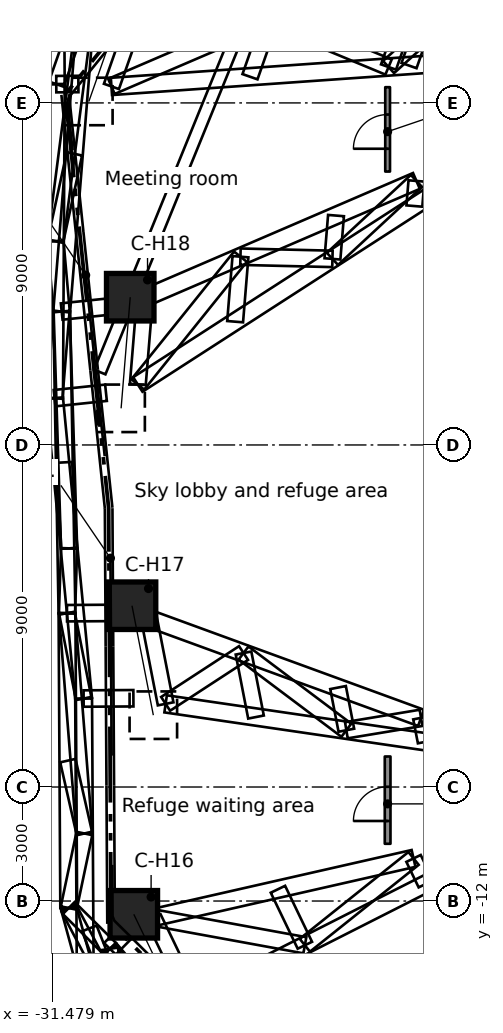
"""IFC4 building model, lengths in metres.
Left out: names, types, materials, properties, quantities, classifications, styles, units other than length and angle.
Written with IfcOpenShell. Run it as: python <this file> out.ifc"""

import sys

from ifc_helpers import new_model, si_unit, direction, frame, frame_2d, origin, origin_2d, place, context, subcontext, project, spatial, rectangle, extrude, element, fill, save


model = new_model("IFC4")
c1 = context("Model", 3, precision=1e-05, world=origin(), true_north=direction((0.0, 1.0)))
c2 = subcontext(c1, "Body", "Model", "MODEL_VIEW")
j1 = project(units=[si_unit("LENGTHUNIT", "METRE"), si_unit("PLANEANGLEUNIT", "RADIAN")], contexts=[c1])
p1 = place(None, origin())
s1 = spatial("IfcSite", under=j1, at=p1, CompositionType="ELEMENT")
p2 = place(p1, origin())
s2 = spatial("IfcBuilding", under=s1, at=p2, CompositionType="ELEMENT")
p3 = place(p2, frame((0.0, 0.0, 206.1)))
s3 = spatial("IfcBuildingStorey", under=s2, at=p3, CompositionType="ELEMENT", Elevation=206.1)
p4 = place(p3, frame((-29.329, -12.349, 0.413), z_axis=(0.286274556016, -0.5954182598, 0.750682339258), x_axis=(0.901243098623, 0.433313832209, 0.0)))
e1 = element("IfcColumn", 1, at=p4, inside=s3, PredefinedType="COLUMN", context=c2, shape_type="SweptSolid", body=[
    extrude(rectangle(XDim=1.25, YDim=1.25, at=origin_2d()), origin(), (0.0, 0.0, 1.0), 4.761),
])
p5 = place(p3, frame((-29.376, -4.23, 0.394), z_axis=(0.120561844769, -0.618915614767, 0.776149665582), x_axis=(0.981550812266, 0.191201472119, 0.0)))
e2 = element("IfcColumn", 2, at=p5, inside=s3, PredefinedType="COLUMN", context=c2, shape_type="SweptSolid", body=[
    extrude(rectangle(XDim=1.25, YDim=1.25, at=origin_2d()), origin(), (0.0, 0.0, 1.0), 4.654),
])
p6 = place(p3, frame((-29.423, 3.888, 0.394), z_axis=(-0.051576127766, -0.628357788529, 0.776212852663), x_axis=(0.99664829532, -0.081805717627, 0.0)))
e3 = element("IfcColumn", 3, at=p6, inside=s3, PredefinedType="COLUMN", context=c2, shape_type="SweptSolid", body=[
    extrude(rectangle(XDim=1.25, YDim=1.25, at=origin_2d()), origin(), (0.0, 0.0, 1.0), 4.653),
])
p7 = place(p3, frame((-29.47, 12.007, 0.413), z_axis=(-0.21882689292, -0.623513084536, 0.750563937548), x_axis=(0.943576164623, -0.331155585117, 0.0)))
e4 = element("IfcColumn", 4, at=p7, inside=s3, PredefinedType="COLUMN", context=c2, shape_type="SweptSolid", body=[
    extrude(rectangle(XDim=1.25, YDim=1.25, at=origin_2d()), origin(), (0.0, 0.0, 1.0), 4.762),
])
p8 = place(p3, frame((-22.65, -10.494, 0.0), z_axis=(0.0, 0.0, 1.0), x_axis=(0.0, 1.0, 0.0)))
e5 = element("IfcWall", 5, at=p8, inside=s3, PredefinedType="PARTITIONING", context=c2, shape_type="SweptSolid", body=[
    extrude(rectangle(XDim=2.297, YDim=0.15, at=frame_2d((1.148, 0.0))), origin(), (0.0, 0.0, 1.0), 3.98),
])
p9 = place(p8, frame((0.6, 0.0, 0.0)))
e6 = element("IfcOpeningElement", 6, at=p9, cuts=e5, PredefinedType="OPENING", context=c2, shape_type="SweptSolid", body=[
    extrude(rectangle(XDim=0.9, YDim=2.1, at=frame_2d((0.45, 1.05))), frame((0.0, 0.085, 0.0), z_axis=(0.0, -1.0, 0.0), x_axis=(1.0, 0.0, 0.0)), (0.0, 0.0, 1.0), 0.17),
])
p10 = place(p3, frame((-22.65, 7.194, 0.0), z_axis=(0.0, 0.0, 1.0), x_axis=(0.0, 1.0, 0.0)))
e7 = element("IfcWall", 7, at=p10, inside=s3, PredefinedType="PARTITIONING", context=c2, shape_type="SweptSolid", body=[
    extrude(rectangle(XDim=2.22, YDim=0.125, at=frame_2d((1.11, 0.0))), origin(), (0.0, 0.0, 1.0), 3.98),
])
p11 = place(p10, frame((0.6, 0.0, 0.0)))
e8 = element("IfcOpeningElement", 8, at=p11, cuts=e7, PredefinedType="OPENING", context=c2, shape_type="SweptSolid", body=[
    extrude(rectangle(XDim=0.9, YDim=2.1, at=frame_2d((0.45, 1.05))), frame((0.0, 0.073, 0.0), z_axis=(0.0, -1.0, 0.0), x_axis=(1.0, 0.0, 0.0)), (0.0, 0.0, 1.0), 0.145),
])
p12 = place(p9, origin())
e9 = element("IfcDoor", 9, at=p12, inside=s3, OperationType="SINGLE_SWING_LEFT", PredefinedType="DOOR", context=c2, shape_type="SweptSolid", body=[
    extrude(rectangle(XDim=0.9, YDim=2.1, at=frame_2d((0.45, 1.05))), frame((0.0, 0.025, 0.0), z_axis=(0.0, -1.0, 0.0), x_axis=(1.0, 0.0, 0.0)), (0.0, 0.0, 1.0), 0.05),
])
fill(e6, e9)
p13 = place(p11, origin())
e10 = element("IfcDoor", 10, at=p13, inside=s3, OperationType="SINGLE_SWING_LEFT", PredefinedType="DOOR", context=c2, shape_type="SweptSolid", body=[
    extrude(rectangle(XDim=0.9, YDim=2.1, at=frame_2d((0.45, 1.05))), frame((0.0, 0.025, 0.0), z_axis=(0.0, -1.0, 0.0), x_axis=(1.0, 0.0, 0.0)), (0.0, 0.0, 1.0), 0.05),
])
fill(e8, e10)
save(model, sys.argv[1])
